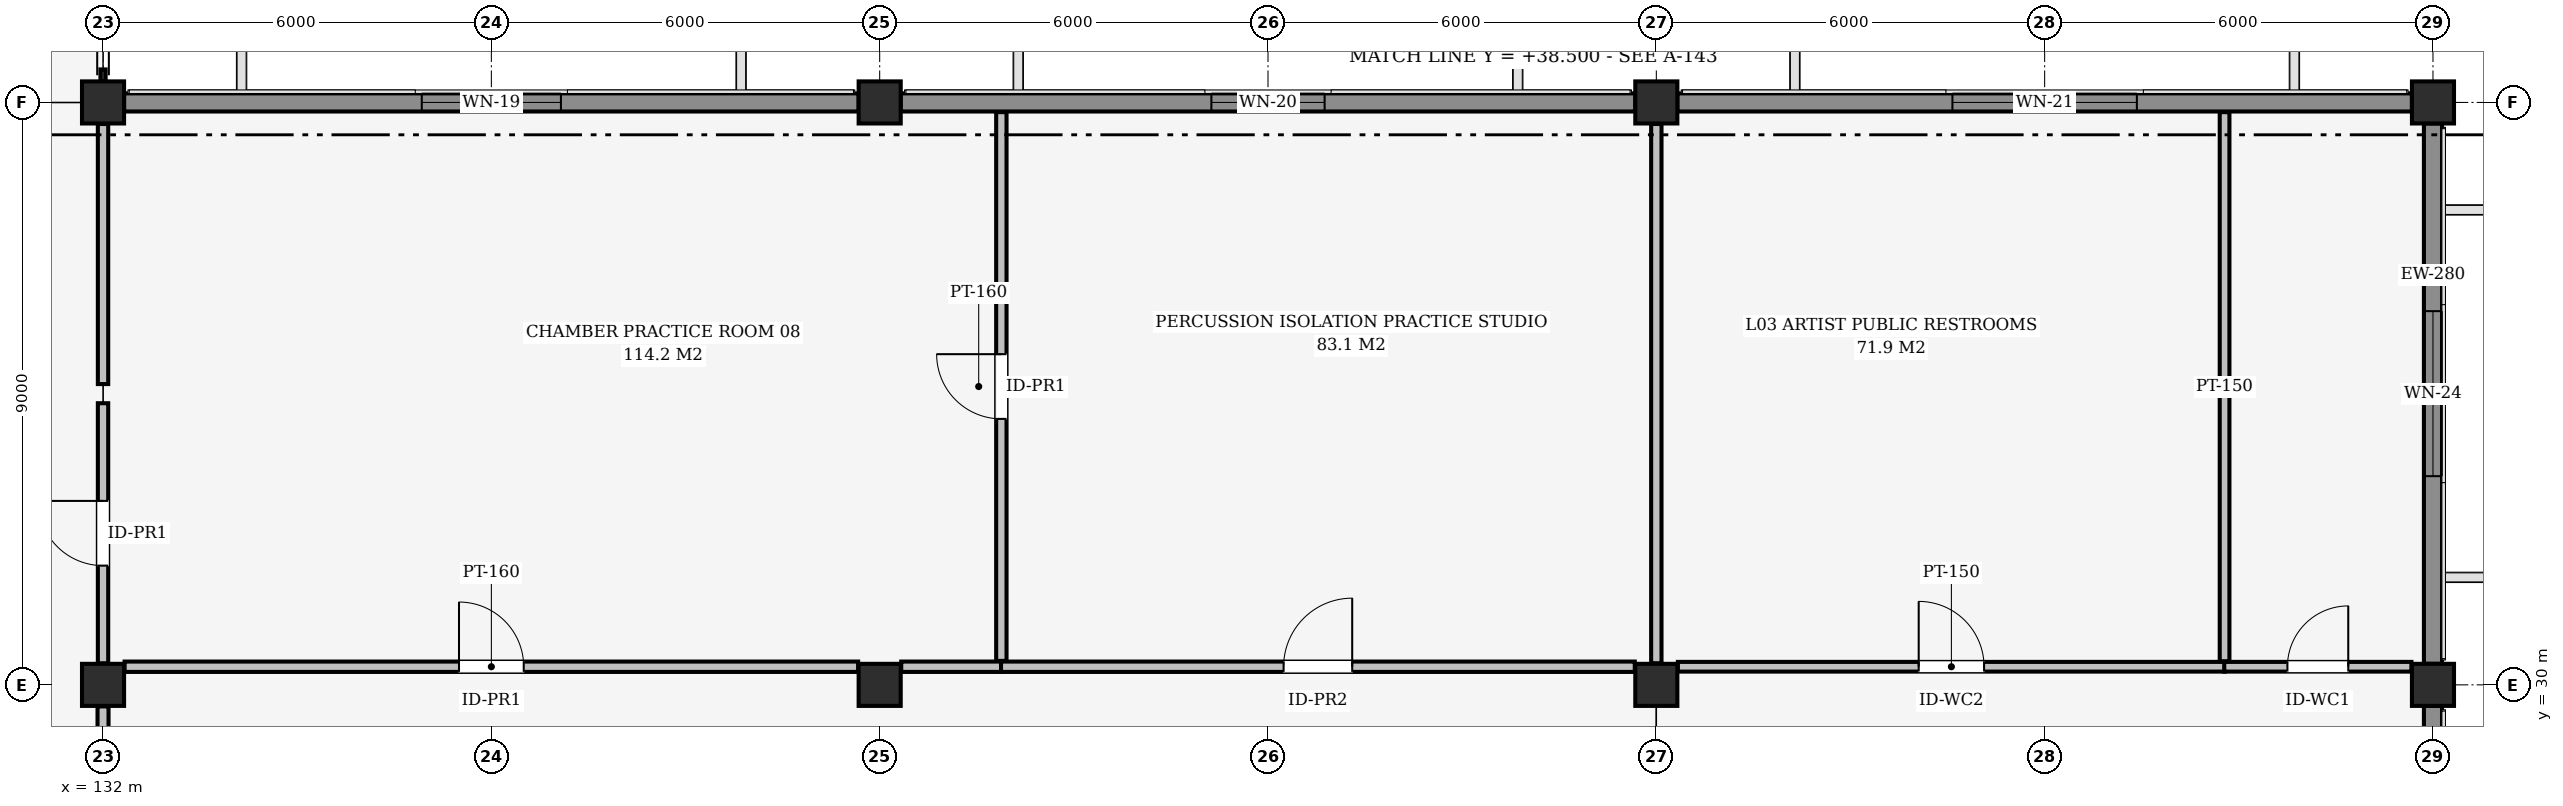
"""IFC4 building model, lengths in metres.
Left out: names, types, materials, properties, quantities, classifications, styles, units other than length and angle.
Written with IfcOpenShell. Run it as: python <this file> out.ifc"""

import sys

from ifc_helpers import new_model, si_unit, direction, frame, frame_2d, origin, origin_2d, place, context, subcontext, project, spatial, rectangle, extrude, element, fill, save


model = new_model("IFC4")
c1 = context("Model", 3, precision=1e-05, world=origin(), true_north=direction((0.0, 1.0)))
c2 = subcontext(c1, "Body", "Model", "MODEL_VIEW")
j1 = project(units=[si_unit("LENGTHUNIT", "METRE"), si_unit("PLANEANGLEUNIT", "RADIAN")], contexts=[c1])
p1 = place(None, origin())
s1 = spatial("IfcSite", under=j1, at=p1, CompositionType="ELEMENT")
p2 = place(p1, origin())
s2 = spatial("IfcBuilding", under=s1, at=p2, CompositionType="ELEMENT")
p3 = place(p2, frame((0.0, 0.0, 13.8)))
s3 = spatial("IfcBuildingStorey", under=s2, at=p3, CompositionType="ELEMENT", Elevation=13.8)
for number, where, z_axis, x_axis in (
    (1, (132.0, 30.0, 0.0), (0.0, 0.0, 1.0), (1.0, 0.0, 0.0)),
    (2, (132.0, 39.0, 0.0), (0.0, 0.0, 1.0), (1.0, 0.0, 0.0)),
    (3, (144.0, 30.0, 0.0), (0.0, 0.0, 1.0), (1.0, 0.0, 0.0)),
    (4, (144.0, 39.0, 0.0), (0.0, 0.0, 1.0), (1.0, 0.0, 0.0)),
    (5, (156.0, 30.0, 0.0), (0.0, 0.0, 1.0), (1.0, 0.0, 0.0)),
    (6, (156.0, 39.0, 0.0), (0.0, 0.0, 1.0), (1.0, 0.0, 0.0)),
    (7, (168.0, 30.0, 0.0), (0.0, 0.0, 1.0), (1.0, 0.0, 0.0)),
    (8, (168.0, 39.0, 0.0), (0.0, 0.0, 1.0), (1.0, 0.0, 0.0)),
):
    element("IfcColumn", number, at=place(p3, frame(where, z_axis=z_axis, x_axis=x_axis)), inside=s3, PredefinedType="COLUMN", context=c2, shape_type="SweptSolid", body=[
        extrude(rectangle(XDim=0.65, YDim=0.65, at=origin_2d()), origin(), (0.0, 0.0, 1.0), 4.5),
    ])
p4 = place(p3, frame((132.325, 39.0, 0.0), z_axis=(0.0, 0.0, 1.0), x_axis=(1.0, 0.0, 0.0)))
e9 = element("IfcWall", 9, at=p4, inside=s3, PredefinedType="SOLIDWALL", context=c2, shape_type="SweptSolid", body=[
    extrude(rectangle(XDim=11.35, YDim=0.28, at=frame_2d((5.675, 0.0))), origin(), (0.0, 0.0, 1.0), 3.599),
])
p5 = place(p4, frame((4.6, 0.0, 0.85)))
e10 = element("IfcOpeningElement", 10, at=p5, cuts=e9, PredefinedType="OPENING", context=c2, shape_type="SweptSolid", body=[
    extrude(rectangle(XDim=2.15, YDim=1.55, at=frame_2d((1.075, 0.775))), frame((0.0, 0.15, 0.0), z_axis=(0.0, -1.0, 0.0), x_axis=(1.0, 0.0, 0.0)), (0.0, 0.0, 1.0), 0.3),
])
p6 = place(p3, frame((144.325, 39.0, 0.0), z_axis=(0.0, 0.0, 1.0), x_axis=(1.0, 0.0, 0.0)))
e11 = element("IfcWall", 11, at=p6, inside=s3, PredefinedType="SOLIDWALL", context=c2, shape_type="SweptSolid", body=[
    extrude(rectangle(XDim=11.35, YDim=0.28, at=frame_2d((5.675, 0.0))), origin(), (0.0, 0.0, 1.0), 3.599),
])
p7 = place(p6, frame((4.8, 0.0, 0.85)))
e12 = element("IfcOpeningElement", 12, at=p7, cuts=e11, PredefinedType="OPENING", context=c2, shape_type="SweptSolid", body=[
    extrude(rectangle(XDim=1.75, YDim=1.45, at=frame_2d((0.875, 0.725))), frame((0.0, 0.15, 0.0), z_axis=(0.0, -1.0, 0.0), x_axis=(1.0, 0.0, 0.0)), (0.0, 0.0, 1.0), 0.3),
])
p8 = place(p3, frame((156.325, 39.0, 0.0), z_axis=(0.0, 0.0, 1.0), x_axis=(1.0, 0.0, 0.0)))
e13 = element("IfcWall", 13, at=p8, inside=s3, PredefinedType="SOLIDWALL", context=c2, shape_type="SweptSolid", body=[
    extrude(rectangle(XDim=11.35, YDim=0.28, at=frame_2d((5.675, 0.0))), origin(), (0.0, 0.0, 1.0), 3.599),
])
p9 = place(p8, frame((4.25, 0.0, 0.6)))
e14 = element("IfcOpeningElement", 14, at=p9, cuts=e13, PredefinedType="OPENING", context=c2, shape_type="SweptSolid", body=[
    extrude(rectangle(XDim=2.85, YDim=2.0, at=frame_2d((1.425, 1.0))), frame((0.0, 0.15, 0.0), z_axis=(0.0, -1.0, 0.0), x_axis=(1.0, 0.0, 0.0)), (0.0, 0.0, 1.0), 0.3),
])
p10 = place(p3, frame((168.0, 29.675, 0.0), z_axis=(0.0, 0.0, 1.0), x_axis=(0.0, -1.0, 0.0)))
e15 = element("IfcWall", 15, at=p10, inside=s3, PredefinedType="SOLIDWALL", context=c2, shape_type="SweptSolid", body=[
    extrude(rectangle(XDim=5.35, YDim=0.28, at=frame_2d((2.675, 0.0))), origin(), (0.0, 0.0, 1.0), 3.598),
])
p11 = place(p10, frame((1.725, 0.0, 0.85)))
e16 = element("IfcOpeningElement", 16, at=p11, cuts=e15, PredefinedType="OPENING", context=c2, shape_type="SweptSolid", body=[
    extrude(rectangle(XDim=1.9, YDim=1.6, at=frame_2d((0.95, 0.8))), frame((0.0, 0.15, 0.0), z_axis=(0.0, -1.0, 0.0), x_axis=(1.0, 0.0, 0.0)), (0.0, 0.0, 1.0), 0.3),
])
p12 = place(p3, frame((168.0, 38.675, 0.0), z_axis=(0.0, 0.0, 1.0), x_axis=(0.0, -1.0, 0.0)))
e17 = element("IfcWall", 17, at=p12, inside=s3, PredefinedType="SOLIDWALL", context=c2, shape_type="SweptSolid", body=[
    extrude(rectangle(XDim=8.35, YDim=0.28, at=frame_2d((4.175, 0.0))), origin(), (0.0, 0.0, 1.0), 3.599),
])
p13 = place(p12, frame((2.9, 0.0, 0.85)))
e18 = element("IfcOpeningElement", 18, at=p13, cuts=e17, PredefinedType="OPENING", context=c2, shape_type="SweptSolid", body=[
    extrude(rectangle(XDim=2.55, YDim=1.05, at=frame_2d((1.275, 0.525))), frame((0.0, 0.15, 0.0), z_axis=(0.0, -1.0, 0.0), x_axis=(1.0, 0.0, 0.0)), (0.0, 0.0, 1.0), 0.3),
])
p14 = place(p3, frame((132.0, 24.333, 0.0), z_axis=(0.0, 0.0, 1.0), x_axis=(0.0, 1.0, 0.0)))
e19 = element("IfcWall", 19, at=p14, inside=s3, PredefinedType="PARTITIONING", context=c2, shape_type="SweptSolid", body=[
    extrude(rectangle(XDim=5.334, YDim=0.17, at=frame_2d((2.667, 0.0))), origin(), (0.0, 0.0, 1.0), 3.801),
])
p15 = place(p14, frame((2.057, 0.0, 0.0)))
e20 = element("IfcOpeningElement", 20, at=p15, cuts=e19, PredefinedType="OPENING", context=c2, shape_type="SweptSolid", body=[
    extrude(rectangle(XDim=1.22, YDim=2.18, at=frame_2d((0.61, 1.09))), frame((0.0, 0.095, 0.0), z_axis=(0.0, -1.0, 0.0), x_axis=(1.0, 0.0, 0.0)), (0.0, 0.0, 1.0), 0.19),
])
p16 = place(p3, frame((132.0, 30.333, 0.0), z_axis=(0.0, 0.0, 1.0), x_axis=(0.0, 1.0, 0.0)))
e21 = element("IfcWall", 21, at=p16, inside=s3, PredefinedType="PARTITIONING", context=c2, shape_type="SweptSolid", body=[
    extrude(rectangle(XDim=4.019, YDim=0.16, at=frame_2d((2.01, 0.0))), origin(), (0.0, 0.0, 1.0), 3.801),
])
p17 = place(p16, frame((1.51, 0.0, 0.0)))
e22 = element("IfcOpeningElement", 22, at=p17, cuts=e21, PredefinedType="OPENING", context=c2, shape_type="SweptSolid", body=[
    extrude(rectangle(XDim=1.0, YDim=2.16, at=frame_2d((0.5, 1.08))), frame((0.0, 0.09, 0.0), z_axis=(0.0, -1.0, 0.0), x_axis=(1.0, 0.0, 0.0)), (0.0, 0.0, 1.0), 0.18),
])
p18 = place(p3, frame((132.0, 34.648, 0.0), z_axis=(0.0, 0.0, 1.0), x_axis=(0.0, 1.0, 0.0)))
e23 = element("IfcWall", 23, at=p18, inside=s3, PredefinedType="PARTITIONING", context=c2, shape_type="SweptSolid", body=[
    extrude(rectangle(XDim=4.019, YDim=0.16, at=frame_2d((2.01, 0.0))), origin(), (0.0, 0.0, 1.0), 3.801),
])
p19 = place(p3, frame((132.333, 30.28, 0.0), z_axis=(0.0, 0.0, 1.0), x_axis=(1.0, 0.0, 0.0)))
e24 = element("IfcWall", 24, at=p19, inside=s3, PredefinedType="PARTITIONING", context=c2, shape_type="SweptSolid", body=[
    extrude(rectangle(XDim=11.334, YDim=0.16, at=frame_2d((5.667, 0.0))), origin(), (0.0, 0.0, 1.0), 3.599),
])
p20 = place(p19, frame((5.167, 0.0, 0.0)))
e25 = element("IfcOpeningElement", 25, at=p20, cuts=e24, PredefinedType="OPENING", context=c2, shape_type="SweptSolid", body=[
    extrude(rectangle(XDim=1.0, YDim=2.16, at=frame_2d((0.5, 1.08))), frame((0.0, 0.09, 0.0), z_axis=(0.0, -1.0, 0.0), x_axis=(1.0, 0.0, 0.0)), (0.0, 0.0, 1.0), 0.18),
])
p21 = place(p3, frame((144.333, 30.28, 0.0), z_axis=(0.0, 0.0, 1.0), x_axis=(1.0, 0.0, 0.0)))
e26 = element("IfcWall", 26, at=p21, inside=s3, PredefinedType="PARTITIONING", context=c2, shape_type="SweptSolid", body=[
    extrude(rectangle(XDim=1.552, YDim=0.16, at=frame_2d((0.776, 0.0))), origin(), (0.0, 0.0, 1.0), 3.599),
])
p22 = place(p3, frame((145.875, 30.28, 0.0), z_axis=(0.0, 0.0, 1.0), x_axis=(1.0, 0.0, 0.0)))
e27 = element("IfcWall", 27, at=p22, inside=s3, PredefinedType="PARTITIONING", context=c2, shape_type="SweptSolid", body=[
    extrude(rectangle(XDim=9.792, YDim=0.16, at=frame_2d((4.896, 0.0))), origin(), (0.0, 0.0, 1.0), 3.599),
])
p23 = place(p22, frame((4.366, 0.0, 0.0)))
e28 = element("IfcOpeningElement", 28, at=p23, cuts=e27, PredefinedType="OPENING", context=c2, shape_type="SweptSolid", body=[
    extrude(rectangle(XDim=1.06, YDim=2.22, at=frame_2d((0.53, 1.11))), frame((0.0, 0.09, 0.0), z_axis=(0.0, -1.0, 0.0), x_axis=(1.0, 0.0, 0.0)), (0.0, 0.0, 1.0), 0.18),
])
p24 = place(p3, frame((156.333, 30.28, 0.0), z_axis=(0.0, 0.0, 1.0), x_axis=(1.0, 0.0, 0.0)))
e29 = element("IfcWall", 29, at=p24, inside=s3, PredefinedType="PARTITIONING", context=c2, shape_type="SweptSolid", body=[
    extrude(rectangle(XDim=8.452, YDim=0.15, at=frame_2d((4.226, 0.0))), origin(), (0.0, 0.0, 1.0), 3.599),
])
p25 = place(p24, frame((3.721, 0.0, 0.0)))
e30 = element("IfcOpeningElement", 30, at=p25, cuts=e29, PredefinedType="OPENING", context=c2, shape_type="SweptSolid", body=[
    extrude(rectangle(XDim=1.01, YDim=2.1, at=frame_2d((0.505, 1.05))), frame((0.0, 0.085, 0.0), z_axis=(0.0, -1.0, 0.0), x_axis=(1.0, 0.0, 0.0)), (0.0, 0.0, 1.0), 0.17),
])
p26 = place(p3, frame((164.775, 30.28, 0.0), z_axis=(0.0, 0.0, 1.0), x_axis=(1.0, 0.0, 0.0)))
e31 = element("IfcWall", 31, at=p26, inside=s3, PredefinedType="PARTITIONING", context=c2, shape_type="SweptSolid", body=[
    extrude(rectangle(XDim=2.892, YDim=0.15, at=frame_2d((1.446, 0.0))), origin(), (0.0, 0.0, 1.0), 3.599),
])
p27 = place(p26, frame((0.976, 0.0, 0.0)))
e32 = element("IfcOpeningElement", 32, at=p27, cuts=e31, PredefinedType="OPENING", context=c2, shape_type="SweptSolid", body=[
    extrude(rectangle(XDim=0.94, YDim=2.1, at=frame_2d((0.47, 1.05))), frame((0.0, 0.085, 0.0), z_axis=(0.0, -1.0, 0.0), x_axis=(1.0, 0.0, 0.0)), (0.0, 0.0, 1.0), 0.17),
])
p28 = place(p3, frame((145.88, 30.37, 0.0), z_axis=(0.0, 0.0, 1.0), x_axis=(0.0, 1.0, 0.0)))
e33 = element("IfcWall", 33, at=p28, inside=s3, PredefinedType="PARTITIONING", context=c2, shape_type="SweptSolid", body=[
    extrude(rectangle(XDim=8.48, YDim=0.16, at=frame_2d((4.24, 0.0))), origin(), (0.0, 0.0, 1.0), 3.753),
])
p29 = place(p28, frame((3.74, 0.0, 0.0)))
e34 = element("IfcOpeningElement", 34, at=p29, cuts=e33, PredefinedType="OPENING", context=c2, shape_type="SweptSolid", body=[
    extrude(rectangle(XDim=1.0, YDim=2.16, at=frame_2d((0.5, 1.08))), frame((0.0, 0.09, 0.0), z_axis=(0.0, -1.0, 0.0), x_axis=(1.0, 0.0, 0.0)), (0.0, 0.0, 1.0), 0.18),
])
p30 = place(p3, frame((156.0, 30.333, 0.0), z_axis=(0.0, 0.0, 1.0), x_axis=(0.0, 1.0, 0.0)))
e35 = element("IfcWall", 35, at=p30, inside=s3, PredefinedType="PARTITIONING", context=c2, shape_type="SweptSolid", body=[
    extrude(rectangle(XDim=8.334, YDim=0.16, at=frame_2d((4.167, 0.0))), origin(), (0.0, 0.0, 1.0), 3.599),
])
p31 = place(p3, frame((164.78, 30.365, 0.0), z_axis=(0.0, 0.0, 1.0), x_axis=(0.0, 1.0, 0.0)))
e36 = element("IfcWall", 36, at=p31, inside=s3, PredefinedType="PARTITIONING", context=c2, shape_type="SweptSolid", body=[
    extrude(rectangle(XDim=8.485, YDim=0.15, at=frame_2d((4.243, 0.0))), origin(), (0.0, 0.0, 1.0), 3.753),
])
p32 = place(p5, origin())
e37 = element("IfcWindow", 37, at=p32, inside=s3, PartitioningType="SINGLE_PANEL", PredefinedType="WINDOW", context=c2, shape_type="SweptSolid", body=[
    extrude(rectangle(XDim=2.15, YDim=1.55, at=frame_2d((1.075, 0.775))), frame((0.0, 0.03, 0.0), z_axis=(0.0, -1.0, 0.0), x_axis=(1.0, 0.0, 0.0)), (0.0, 0.0, 1.0), 0.06),
])
fill(e10, e37)
p33 = place(p7, origin())
e38 = element("IfcWindow", 38, at=p33, inside=s3, PartitioningType="SINGLE_PANEL", PredefinedType="WINDOW", context=c2, shape_type="SweptSolid", body=[
    extrude(rectangle(XDim=1.75, YDim=1.45, at=frame_2d((0.875, 0.725))), frame((0.0, 0.03, 0.0), z_axis=(0.0, -1.0, 0.0), x_axis=(1.0, 0.0, 0.0)), (0.0, 0.0, 1.0), 0.06),
])
fill(e12, e38)
p34 = place(p9, origin())
e39 = element("IfcWindow", 39, at=p34, inside=s3, PartitioningType="SINGLE_PANEL", PredefinedType="WINDOW", context=c2, shape_type="SweptSolid", body=[
    extrude(rectangle(XDim=2.85, YDim=2.0, at=frame_2d((1.425, 1.0))), frame((0.0, 0.03, 0.0), z_axis=(0.0, -1.0, 0.0), x_axis=(1.0, 0.0, 0.0)), (0.0, 0.0, 1.0), 0.06),
])
fill(e14, e39)
p35 = place(p13, origin())
e40 = element("IfcWindow", 40, at=p35, inside=s3, PartitioningType="SINGLE_PANEL", PredefinedType="WINDOW", context=c2, shape_type="SweptSolid", body=[
    extrude(rectangle(XDim=2.55, YDim=1.05, at=frame_2d((1.275, 0.525))), frame((0.0, 0.03, 0.0), z_axis=(0.0, -1.0, 0.0), x_axis=(1.0, 0.0, 0.0)), (0.0, 0.0, 1.0), 0.06),
])
fill(e18, e40)
p36 = place(p17, origin())
e41 = element("IfcDoor", 41, at=p36, inside=s3, OperationType="SINGLE_SWING_RIGHT", PredefinedType="DOOR", context=c2, shape_type="SweptSolid", body=[
    extrude(rectangle(XDim=1.0, YDim=2.16, at=frame_2d((0.5, 1.08))), frame((0.0, 0.025, 0.0), z_axis=(0.0, -1.0, 0.0), x_axis=(1.0, 0.0, 0.0)), (0.0, 0.0, 1.0), 0.05),
])
fill(e22, e41)
p37 = place(p20, origin())
e42 = element("IfcDoor", 42, at=p37, inside=s3, OperationType="SINGLE_SWING_LEFT", PredefinedType="DOOR", context=c2, shape_type="SweptSolid", body=[
    extrude(rectangle(XDim=1.0, YDim=2.16, at=frame_2d((0.5, 1.08))), frame((0.0, 0.025, 0.0), z_axis=(0.0, -1.0, 0.0), x_axis=(1.0, 0.0, 0.0)), (0.0, 0.0, 1.0), 0.05),
])
fill(e25, e42)
p38 = place(p23, origin())
e43 = element("IfcDoor", 43, at=p38, inside=s3, OperationType="SINGLE_SWING_RIGHT", PredefinedType="DOOR", context=c2, shape_type="SweptSolid", body=[
    extrude(rectangle(XDim=1.06, YDim=2.22, at=frame_2d((0.53, 1.11))), frame((0.0, 0.025, 0.0), z_axis=(0.0, -1.0, 0.0), x_axis=(1.0, 0.0, 0.0)), (0.0, 0.0, 1.0), 0.05),
])
fill(e28, e43)
p39 = place(p25, origin())
e44 = element("IfcDoor", 44, at=p39, inside=s3, OperationType="SINGLE_SWING_LEFT", PredefinedType="DOOR", context=c2, shape_type="SweptSolid", body=[
    extrude(rectangle(XDim=1.01, YDim=2.1, at=frame_2d((0.505, 1.05))), frame((0.0, 0.025, 0.0), z_axis=(0.0, -1.0, 0.0), x_axis=(1.0, 0.0, 0.0)), (0.0, 0.0, 1.0), 0.05),
])
fill(e30, e44)
p40 = place(p27, origin())
e45 = element("IfcDoor", 45, at=p40, inside=s3, OperationType="SINGLE_SWING_RIGHT", PredefinedType="DOOR", context=c2, shape_type="SweptSolid", body=[
    extrude(rectangle(XDim=0.94, YDim=2.1, at=frame_2d((0.47, 1.05))), frame((0.0, 0.025, 0.0), z_axis=(0.0, -1.0, 0.0), x_axis=(1.0, 0.0, 0.0)), (0.0, 0.0, 1.0), 0.05),
])
fill(e32, e45)
p41 = place(p29, origin())
e46 = element("IfcDoor", 46, at=p41, inside=s3, OperationType="SINGLE_SWING_RIGHT", PredefinedType="DOOR", context=c2, shape_type="SweptSolid", body=[
    extrude(rectangle(XDim=1.0, YDim=2.16, at=frame_2d((0.5, 1.08))), frame((0.0, 0.025, 0.0), z_axis=(0.0, -1.0, 0.0), x_axis=(1.0, 0.0, 0.0)), (0.0, 0.0, 1.0), 0.05),
])
fill(e34, e46)
save(model, sys.argv[1])
